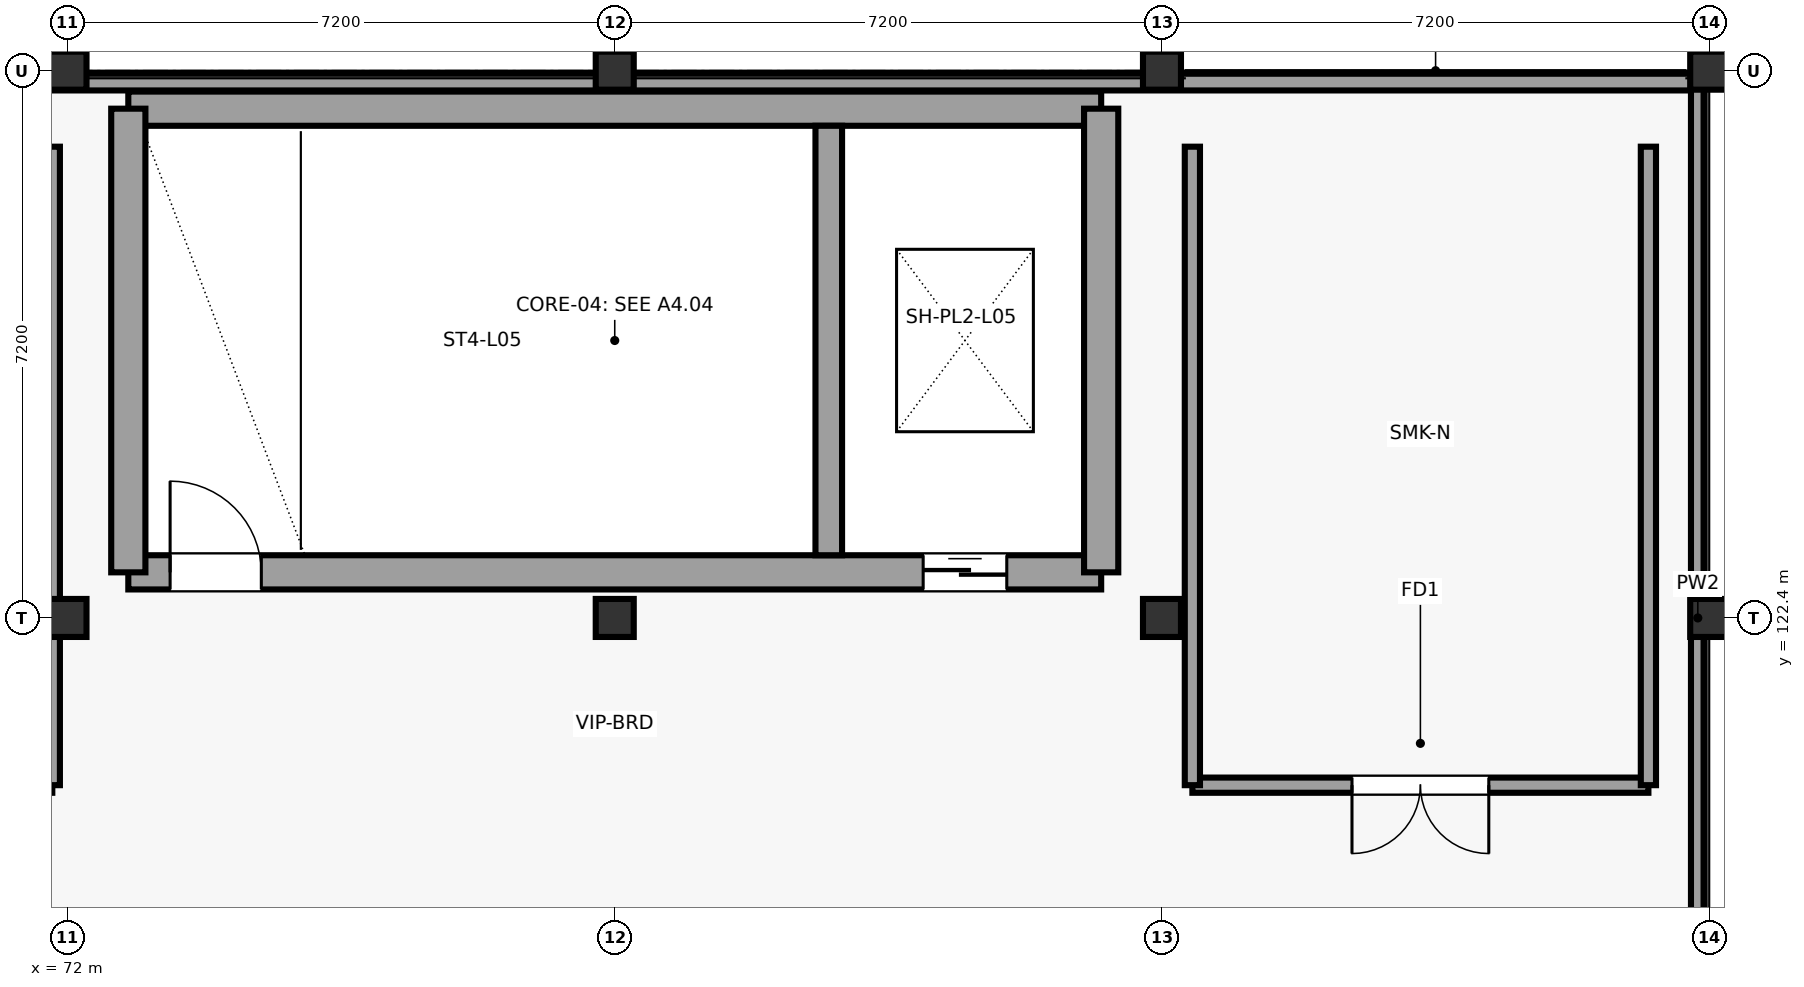
"""IFC4 building model, lengths in metres.
Left out: names, types, materials, properties, quantities, classifications, styles, units other than length and angle.
Written with IfcOpenShell. Run it as: python <this file> out.ifc"""

import sys

from ifc_helpers import new_model, si_unit, direction, frame, frame_2d, origin, origin_2d, place, context, subcontext, project, spatial, rectangle, extrude, element, fill, save


model = new_model("IFC4")
c1 = context("Model", 3, precision=1e-05, world=origin(), true_north=direction((0.0, 1.0)))
c2 = subcontext(c1, "Body", "Model", "MODEL_VIEW")
j1 = project(units=[si_unit("LENGTHUNIT", "METRE"), si_unit("PLANEANGLEUNIT", "RADIAN")], contexts=[c1])
p1 = place(None, origin())
s1 = spatial("IfcSite", under=j1, at=p1, CompositionType="ELEMENT")
p2 = place(p1, origin())
s2 = spatial("IfcBuilding", under=s1, at=p2, CompositionType="ELEMENT")
p3 = place(p2, frame((0.0, 0.0, 23.0)))
s3 = spatial("IfcBuildingStorey", under=s2, at=p3, CompositionType="ELEMENT", Elevation=23.0)
for number, where, z_axis, x_axis in (
    (1, (72.0, 122.4, 0.0), (0.0, 0.0, 1.0), (1.0, 0.0, 0.0)),
    (2, (72.0, 129.6, 0.0), (0.0, 0.0, 1.0), (1.0, 0.0, 0.0)),
    (3, (79.2, 122.4, 0.0), (0.0, 0.0, 1.0), (1.0, 0.0, 0.0)),
    (4, (79.2, 129.6, 0.0), (0.0, 0.0, 1.0), (1.0, 0.0, 0.0)),
    (5, (86.4, 122.4, 0.0), (0.0, 0.0, 1.0), (1.0, 0.0, 0.0)),
    (6, (86.4, 129.6, 0.0), (0.0, 0.0, 1.0), (1.0, 0.0, 0.0)),
    (7, (93.6, 122.4, 0.0), (0.0, 0.0, 1.0), (1.0, 0.0, 0.0)),
    (8, (93.6, 129.6, 0.0), (0.0, 0.0, 1.0), (1.0, 0.0, 0.0)),
):
    element("IfcColumn", number, at=place(p3, frame(where, z_axis=z_axis, x_axis=x_axis)), inside=s3, PredefinedType="COLUMN", context=c2, shape_type="SweptSolid", body=[
        extrude(rectangle(XDim=0.5, YDim=0.5, at=origin_2d()), origin(), (0.0, 0.0, 1.0), 4.5),
    ])
p4 = place(p3, frame((72.8, 123.0, 0.0), z_axis=(0.0, 0.0, 1.0), x_axis=(1.0, 0.0, 0.0)))
e9 = element("IfcWall", 9, at=p4, inside=s3, PredefinedType="SHEAR", context=c2, shape_type="SweptSolid", body=[
    extrude(rectangle(XDim=12.8, YDim=0.45, at=frame_2d((6.4, 0.0))), origin(), (0.0, 0.0, 1.0), 4.28),
])
p5 = place(p4, frame((0.55, 0.0, 0.0)))
e10 = element("IfcOpeningElement", 10, at=p5, cuts=e9, PredefinedType="OPENING", context=c2, shape_type="SweptSolid", body=[
    extrude(rectangle(XDim=1.2, YDim=2.25, at=frame_2d((0.6, 1.125))), frame((0.0, 0.235, 0.0), z_axis=(0.0, -1.0, 0.0), x_axis=(1.0, 0.0, 0.0)), (0.0, 0.0, 1.0), 0.47),
])
p6 = place(p4, frame((10.458, 0.0, 0.0)))
e11 = element("IfcOpeningElement", 11, at=p6, cuts=e9, PredefinedType="OPENING", context=c2, shape_type="SweptSolid", body=[
    extrude(rectangle(XDim=1.1, YDim=2.2, at=frame_2d((0.55, 1.1))), frame((0.0, 0.235, 0.0), z_axis=(0.0, -1.0, 0.0), x_axis=(1.0, 0.0, 0.0)), (0.0, 0.0, 1.0), 0.47),
])
p7 = place(p3, frame((72.8, 129.1, 0.0), z_axis=(0.0, 0.0, 1.0), x_axis=(1.0, 0.0, 0.0)))
e12 = element("IfcWall", 12, at=p7, inside=s3, PredefinedType="SHEAR", context=c2, shape_type="SweptSolid", body=[
    extrude(rectangle(XDim=12.8, YDim=0.45, at=frame_2d((6.4, 0.0))), origin(), (0.0, 0.0, 1.0), 4.28),
])
for number, where, z_axis, x_axis in (
    (13, (72.8, 123.0, 0.0), (0.0, 0.0, 1.0), (0.0, 1.0, 0.0)),
    (14, (85.6, 123.0, 0.0), (0.0, 0.0, 1.0), (0.0, 1.0, 0.0)),
):
    element("IfcWall", number, at=place(p3, frame(where, z_axis=z_axis, x_axis=x_axis)), inside=s3, PredefinedType="SHEAR", context=c2, shape_type="SweptSolid", body=[
        extrude(rectangle(XDim=6.1, YDim=0.45, at=frame_2d((3.05, 0.0))), origin(), (0.0, 0.0, 1.0), 4.28),
    ])
p8 = place(p3, frame((82.016, 123.225, 0.0), z_axis=(0.0, 0.0, 1.0), x_axis=(0.0, 1.0, 0.0)))
e15 = element("IfcWall", 15, at=p8, inside=s3, PredefinedType="SHEAR", context=c2, shape_type="SweptSolid", body=[
    extrude(rectangle(XDim=5.65, YDim=0.35, at=frame_2d((2.825, 0.0))), origin(), (0.0, 0.0, 1.0), 4.28),
])
p9 = place(p3, frame((0.15, 129.45, 4.5), z_axis=(0.0, 0.0, 1.0), x_axis=(1.0, 0.0, 0.0)))
e16 = element("IfcWall", 16, at=p9, inside=s3, PredefinedType="PARAPET", context=c2, shape_type="SweptSolid", body=[
    extrude(rectangle(XDim=93.3, YDim=0.22, at=frame_2d((46.65, 0.0))), origin(), (0.0, 0.0, 1.0), 1.15),
])
p10 = place(p3, frame((93.45, 115.35, 4.5), z_axis=(0.0, 0.0, 1.0), x_axis=(0.0, 1.0, 0.0)))
e17 = element("IfcWall", 17, at=p10, inside=s3, PredefinedType="PARAPET", context=c2, shape_type="SweptSolid", body=[
    extrude(rectangle(XDim=14.1, YDim=0.18, at=frame_2d((7.05, 0.0))), origin(), (0.0, 0.0, 1.0), 1.15),
])
p11 = place(p3, frame((71.8, 120.2, 0.0), z_axis=(0.0, 0.0, 1.0), x_axis=(0.0, 1.0, 0.0)))
e18 = element("IfcWall", 18, at=p11, inside=s3, PredefinedType="PARTITIONING", context=c2, shape_type="SweptSolid", body=[
    extrude(rectangle(XDim=8.4, YDim=0.2, at=frame_2d((4.2, 0.0))), origin(), (0.0, 0.0, 1.0), 3.34),
])
p12 = place(p3, frame((86.8, 120.2, 0.0), z_axis=(0.0, 0.0, 1.0), x_axis=(1.0, 0.0, 0.0)))
e19 = element("IfcWall", 19, at=p12, inside=s3, PredefinedType="PARTITIONING", context=c2, shape_type="SweptSolid", body=[
    extrude(rectangle(XDim=6.0, YDim=0.2, at=frame_2d((3.0, 0.0))), origin(), (0.0, 0.0, 1.0), 3.34),
])
p13 = place(p12, frame((2.1, 0.0, 0.0)))
e20 = element("IfcOpeningElement", 20, at=p13, cuts=e19, PredefinedType="OPENING", context=c2, shape_type="SweptSolid", body=[
    extrude(rectangle(XDim=1.8, YDim=2.3, at=frame_2d((0.9, 1.15))), frame((0.0, 0.11, 0.0), z_axis=(0.0, -1.0, 0.0), x_axis=(1.0, 0.0, 0.0)), (0.0, 0.0, 1.0), 0.22),
])
for number, where, z_axis, x_axis in (
    (21, (92.8, 120.2, 0.0), (0.0, 0.0, 1.0), (0.0, 1.0, 0.0)),
    (22, (86.8, 128.6, 0.0), (0.0, 0.0, 1.0), (0.0, -1.0, 0.0)),
):
    element("IfcWall", number, at=place(p3, frame(where, z_axis=z_axis, x_axis=x_axis)), inside=s3, PredefinedType="PARTITIONING", context=c2, shape_type="SweptSolid", body=[
        extrude(rectangle(XDim=8.4, YDim=0.2, at=frame_2d((4.2, 0.0))), origin(), (0.0, 0.0, 1.0), 3.34),
    ])
p14 = place(p5, origin())
e23 = element("IfcDoor", 23, at=p14, inside=s3, OperationType="SINGLE_SWING_LEFT", PredefinedType="DOOR", context=c2, shape_type="SweptSolid", body=[
    extrude(rectangle(XDim=1.2, YDim=2.25, at=frame_2d((0.6, 1.125))), frame((0.0, 0.025, 0.0), z_axis=(0.0, -1.0, 0.0), x_axis=(1.0, 0.0, 0.0)), (0.0, 0.0, 1.0), 0.05),
])
fill(e10, e23)
p15 = place(p6, origin())
e24 = element("IfcDoor", 24, at=p15, inside=s3, OperationType="SLIDING_TO_LEFT", PredefinedType="DOOR", context=c2, shape_type="SweptSolid", body=[
    extrude(rectangle(XDim=1.1, YDim=2.2, at=frame_2d((0.55, 1.1))), frame((0.0, 0.025, 0.0), z_axis=(0.0, -1.0, 0.0), x_axis=(1.0, 0.0, 0.0)), (0.0, 0.0, 1.0), 0.05),
])
fill(e11, e24)
p16 = place(p13, frame((1.8, 0.0, 0.0), z_axis=(0.0, 0.0, 1.0), x_axis=(-1.0, 0.0, 0.0)))
e25 = element("IfcDoor", 25, at=p16, inside=s3, OperationType="DOUBLE_DOOR_SINGLE_SWING", PredefinedType="DOOR", context=c2, shape_type="SweptSolid", body=[
    extrude(rectangle(XDim=1.8, YDim=2.3, at=frame_2d((0.9, 1.15))), frame((0.0, 0.025, 0.0), z_axis=(0.0, -1.0, 0.0), x_axis=(1.0, 0.0, 0.0)), (0.0, 0.0, 1.0), 0.05),
])
fill(e20, e25)
save(model, sys.argv[1])
